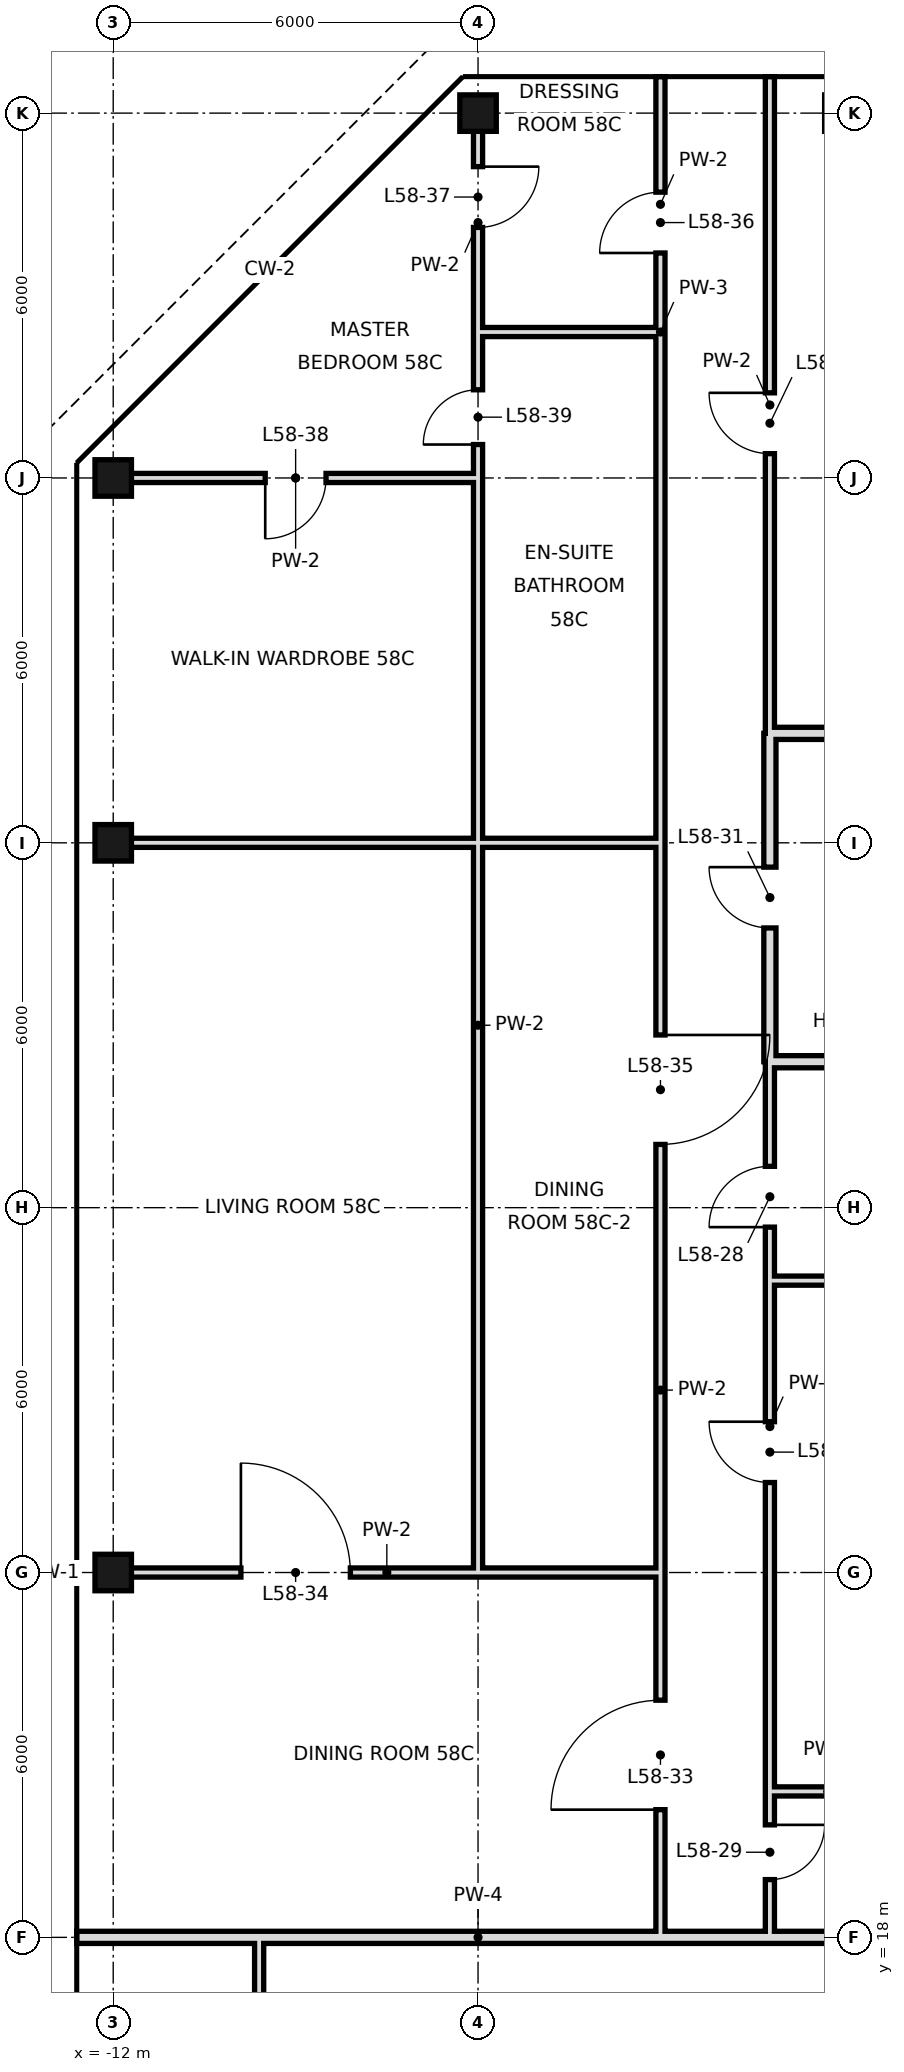
"""IFC4 building model, lengths in metres.
Left out: names, types, materials, properties, quantities, classifications, styles, units other than length and angle.
Written with IfcOpenShell. Run it as: python <this file> out.ifc"""

import sys

from ifc_helpers import new_model, si_unit, direction, frame, frame_2d, origin, origin_2d, place, context, subcontext, project, spatial, rectangle, hollow_rectangle, extrude, element, fill, save


model = new_model("IFC4")
c1 = context("Model", 3, precision=1e-05, world=origin(), true_north=direction((0.0, 1.0)))
c2 = subcontext(c1, "Body", "Model", "MODEL_VIEW")
j1 = project(units=[si_unit("LENGTHUNIT", "METRE"), si_unit("PLANEANGLEUNIT", "RADIAN")], contexts=[c1])
p1 = place(None, origin())
s1 = spatial("IfcSite", under=j1, at=p1, CompositionType="ELEMENT")
p2 = place(p1, origin())
s2 = spatial("IfcBuilding", under=s1, at=p2, CompositionType="ELEMENT")
p3 = place(p2, frame((0.0, 0.0, 246.8)))
s3 = spatial("IfcBuildingStorey", under=s2, at=p3, CompositionType="ELEMENT", Elevation=246.8)
for number, where, z_axis, x_axis in (
    (1, (-12.0, 24.0, 0.0), (0.0, 0.0, 1.0), (1.0, 0.0, 0.0)),
    (2, (-12.0, 36.0, 0.0), (0.0, 0.0, 1.0), (1.0, 0.0, 0.0)),
    (3, (-12.0, 42.0, 0.0), (0.0, 0.0, 1.0), (1.0, 0.0, 0.0)),
    (4, (-6.0, 48.0, 0.0), (0.0, 0.0, 1.0), (1.0, 0.0, 0.0)),
):
    element("IfcColumn", number, at=place(p3, frame(where, z_axis=z_axis, x_axis=x_axis)), inside=s3, PredefinedType="COLUMN", context=c2, shape_type="SweptSolid", body=[
        extrude(hollow_rectangle(XDim=0.6, YDim=0.6, WallThickness=0.028, at=origin_2d()), origin(), (0.0, 0.0, 1.0), 3.6),
    ])
p4 = place(p3, frame((-1.2, 32.4, 0.0), z_axis=(0.0, 0.0, 1.0), x_axis=(0.0, 1.0, 0.0)))
e5 = element("IfcWall", 5, at=p4, inside=s3, PredefinedType="SOLIDWALL", context=c2, shape_type="SweptSolid", body=[
    extrude(rectangle(XDim=5.4, YDim=0.2, at=frame_2d((2.7, 0.0))), origin(), (0.0, 0.0, 1.0), 2.72),
])
p5 = place(p4, frame((2.2, 0.0, 0.0)))
e6 = element("IfcOpeningElement", 6, at=p5, cuts=e5, PredefinedType="OPENING", context=c2, shape_type="SweptSolid", body=[
    extrude(rectangle(XDim=1.0, YDim=2.4, at=frame_2d((0.5, 1.2))), frame((0.0, 0.11, 0.0), z_axis=(0.0, -1.0, 0.0), x_axis=(1.0, 0.0, 0.0)), (0.0, 0.0, 1.0), 0.22),
])
p6 = place(p3, frame((-1.2, 20.4, 0.0), z_axis=(0.0, 0.0, 1.0), x_axis=(0.0, 1.0, 0.0)))
e7 = element("IfcWall", 7, at=p6, inside=s3, PredefinedType="PARTITIONING", context=c2, shape_type="SweptSolid", body=[
    extrude(rectangle(XDim=12.0, YDim=0.15, at=frame_2d((6.0, 0.0))), origin(), (0.0, 0.0, 1.0), 3.42),
])
p7 = place(p6, frame((9.28, 0.0, 0.0)))
e8 = element("IfcOpeningElement", 8, at=p7, cuts=e7, PredefinedType="OPENING", context=c2, shape_type="SweptSolid", body=[
    extrude(rectangle(XDim=1.0, YDim=2.4, at=frame_2d((0.5, 1.2))), frame((0.0, 0.085, 0.0), z_axis=(0.0, -1.0, 0.0), x_axis=(1.0, 0.0, 0.0)), (0.0, 0.0, 1.0), 0.17),
])
p8 = place(p6, frame((5.08, 0.0, 0.0)))
e9 = element("IfcOpeningElement", 9, at=p8, cuts=e7, PredefinedType="OPENING", context=c2, shape_type="SweptSolid", body=[
    extrude(rectangle(XDim=1.0, YDim=2.4, at=frame_2d((0.5, 1.2))), frame((0.0, 0.085, 0.0), z_axis=(0.0, -1.0, 0.0), x_axis=(1.0, 0.0, 0.0)), (0.0, 0.0, 1.0), 0.17),
])
p9 = place(p3, frame((-1.2, 37.8, 0.0), z_axis=(0.0, 0.0, 1.0), x_axis=(0.0, 1.0, 0.0)))
e10 = element("IfcWall", 10, at=p9, inside=s3, PredefinedType="PARTITIONING", context=c2, shape_type="SweptSolid", body=[
    extrude(rectangle(XDim=10.8, YDim=0.15, at=frame_2d((5.4, 0.0))), origin(), (0.0, 0.0, 1.0), 3.42),
])
p10 = place(p9, frame((4.6, 0.0, 0.0)))
e11 = element("IfcOpeningElement", 11, at=p10, cuts=e10, PredefinedType="OPENING", context=c2, shape_type="SweptSolid", body=[
    extrude(rectangle(XDim=1.0, YDim=2.4, at=frame_2d((0.5, 1.2))), frame((0.0, 0.085, 0.0), z_axis=(0.0, -1.0, 0.0), x_axis=(1.0, 0.0, 0.0)), (0.0, 0.0, 1.0), 0.17),
])
p11 = place(p3, frame((-1.2, 18.0, 0.0), z_axis=(0.0, 0.0, 1.0), x_axis=(0.0, 1.0, 0.0)))
e12 = element("IfcWall", 12, at=p11, inside=s3, PredefinedType="PARTITIONING", context=c2, shape_type="SweptSolid", body=[
    extrude(rectangle(XDim=2.4, YDim=0.15, at=frame_2d((1.2, 0.0))), origin(), (0.0, 0.0, 1.0), 3.42),
])
p12 = place(p11, frame((0.95, 0.0, 0.0)))
e13 = element("IfcOpeningElement", 13, at=p12, cuts=e12, PredefinedType="OPENING", context=c2, shape_type="SweptSolid", body=[
    extrude(rectangle(XDim=0.9, YDim=2.4, at=frame_2d((0.45, 1.2))), frame((0.0, 0.085, 0.0), z_axis=(0.0, -1.0, 0.0), x_axis=(1.0, 0.0, 0.0)), (0.0, 0.0, 1.0), 0.17),
])
p13 = place(p3, frame((-3.0, 18.0, 0.0), z_axis=(0.0, 0.0, 1.0), x_axis=(0.0, 1.0, 0.0)))
e14 = element("IfcWall", 14, at=p13, inside=s3, PredefinedType="PARTITIONING", context=c2, shape_type="SweptSolid", body=[
    extrude(rectangle(XDim=18.0, YDim=0.15, at=frame_2d((9.0, 0.0))), origin(), (0.0, 0.0, 1.0), 3.42),
])
p14 = place(p13, frame((2.1, 0.0, 0.0)))
e15 = element("IfcOpeningElement", 15, at=p14, cuts=e14, PredefinedType="OPENING", context=c2, shape_type="SweptSolid", body=[
    extrude(rectangle(XDim=1.8, YDim=2.4, at=frame_2d((0.9, 1.2))), frame((0.0, 0.085, 0.0), z_axis=(0.0, -1.0, 0.0), x_axis=(1.0, 0.0, 0.0)), (0.0, 0.0, 1.0), 0.17),
])
p15 = place(p13, frame((13.04, 0.0, 0.0)))
e16 = element("IfcOpeningElement", 16, at=p15, cuts=e14, PredefinedType="OPENING", context=c2, shape_type="SweptSolid", body=[
    extrude(rectangle(XDim=1.8, YDim=2.4, at=frame_2d((0.9, 1.2))), frame((0.0, 0.085, 0.0), z_axis=(0.0, -1.0, 0.0), x_axis=(1.0, 0.0, 0.0)), (0.0, 0.0, 1.0), 0.17),
])
p16 = place(p3, frame((-3.0, 44.4, 0.0), z_axis=(0.0, 0.0, 1.0), x_axis=(0.0, 1.0, 0.0)))
e17 = element("IfcWall", 17, at=p16, inside=s3, PredefinedType="PARTITIONING", context=c2, shape_type="SweptSolid", body=[
    extrude(rectangle(XDim=4.2, YDim=0.15, at=frame_2d((2.1, 0.0))), origin(), (0.0, 0.0, 1.0), 3.42),
])
p17 = place(p16, frame((1.3, 0.0, 0.0)))
e18 = element("IfcOpeningElement", 18, at=p17, cuts=e17, PredefinedType="OPENING", context=c2, shape_type="SweptSolid", body=[
    extrude(rectangle(XDim=1.0, YDim=2.4, at=frame_2d((0.5, 1.2))), frame((0.0, 0.085, 0.0), z_axis=(0.0, -1.0, 0.0), x_axis=(1.0, 0.0, 0.0)), (0.0, 0.0, 1.0), 0.17),
])
p18 = place(p3, frame((-3.0, 36.0, 0.0), z_axis=(0.0, 0.0, 1.0), x_axis=(0.0, 1.0, 0.0)))
e19 = element("IfcWall", 19, at=p18, inside=s3, PredefinedType="PARTITIONING", context=c2, shape_type="SweptSolid", body=[
    extrude(rectangle(XDim=8.4, YDim=0.15, at=frame_2d((4.2, 0.0))), origin(), (0.0, 0.0, 1.0), 3.42),
])
p19 = place(p3, frame((-6.0, 24.0, 0.0), z_axis=(0.0, 0.0, 1.0), x_axis=(0.0, 1.0, 0.0)))
e20 = element("IfcWall", 20, at=p19, inside=s3, PredefinedType="PARTITIONING", context=c2, shape_type="SweptSolid", body=[
    extrude(rectangle(XDim=12.0, YDim=0.15, at=frame_2d((6.0, 0.0))), origin(), (0.0, 0.0, 1.0), 3.42),
])
p20 = place(p3, frame((-6.0, 44.4, 0.0), z_axis=(0.0, 0.0, 1.0), x_axis=(0.0, 1.0, 0.0)))
e21 = element("IfcWall", 21, at=p20, inside=s3, PredefinedType="PARTITIONING", context=c2, shape_type="SweptSolid", body=[
    extrude(rectangle(XDim=3.6, YDim=0.15, at=frame_2d((1.8, 0.0))), origin(), (0.0, 0.0, 1.0), 3.42),
])
p21 = place(p20, frame((1.72, 0.0, 0.0)))
e22 = element("IfcOpeningElement", 22, at=p21, cuts=e21, PredefinedType="OPENING", context=c2, shape_type="SweptSolid", body=[
    extrude(rectangle(XDim=1.0, YDim=2.4, at=frame_2d((0.5, 1.2))), frame((0.0, 0.085, 0.0), z_axis=(0.0, -1.0, 0.0), x_axis=(1.0, 0.0, 0.0)), (0.0, 0.0, 1.0), 0.17),
])
p22 = place(p3, frame((-6.0, 36.0, 0.0), z_axis=(0.0, 0.0, 1.0), x_axis=(0.0, 1.0, 0.0)))
e23 = element("IfcWall", 23, at=p22, inside=s3, PredefinedType="PARTITIONING", context=c2, shape_type="SweptSolid", body=[
    extrude(rectangle(XDim=8.4, YDim=0.15, at=frame_2d((4.2, 0.0))), origin(), (0.0, 0.0, 1.0), 3.42),
])
p23 = place(p22, frame((6.55, 0.0, 0.0)))
e24 = element("IfcOpeningElement", 24, at=p23, cuts=e23, PredefinedType="OPENING", context=c2, shape_type="SweptSolid", body=[
    extrude(rectangle(XDim=0.9, YDim=2.4, at=frame_2d((0.45, 1.2))), frame((0.0, 0.085, 0.0), z_axis=(0.0, -1.0, 0.0), x_axis=(1.0, 0.0, 0.0)), (0.0, 0.0, 1.0), 0.17),
])
p24 = place(p3, frame((-9.6, 10.8, 0.0), z_axis=(0.0, 0.0, 1.0), x_axis=(0.0, 1.0, 0.0)))
e25 = element("IfcWall", 25, at=p24, inside=s3, PredefinedType="PARTITIONING", context=c2, shape_type="SweptSolid", body=[
    extrude(rectangle(XDim=7.2, YDim=0.15, at=frame_2d((3.6, 0.0))), origin(), (0.0, 0.0, 1.0), 3.42),
])
p25 = place(p3, frame((-12.6, 18.0, 0.0), z_axis=(0.0, 0.0, 1.0), x_axis=(1.0, 0.0, 0.0)))
e26 = element("IfcWall", 26, at=p25, inside=s3, PredefinedType="SOLIDWALL", context=c2, shape_type="SweptSolid", body=[
    extrude(rectangle(XDim=13.2, YDim=0.2, at=frame_2d((6.6, 0.0))), origin(), (0.0, 0.0, 1.0), 2.72),
])
p26 = place(p3, frame((-1.2, 20.4, 0.0), z_axis=(0.0, 0.0, 1.0), x_axis=(1.0, 0.0, 0.0)))
e27 = element("IfcWall", 27, at=p26, inside=s3, PredefinedType="PARTITIONING", context=c2, shape_type="SweptSolid", body=[
    extrude(rectangle(XDim=4.3, YDim=0.15, at=frame_2d((2.15, 0.0))), origin(), (0.0, 0.0, 1.0), 3.42),
])
p27 = place(p3, frame((-12.0, 24.0, 0.0), z_axis=(0.0, 0.0, 1.0), x_axis=(1.0, 0.0, 0.0)))
e28 = element("IfcWall", 28, at=p27, inside=s3, PredefinedType="PARTITIONING", context=c2, shape_type="SweptSolid", body=[
    extrude(rectangle(XDim=9.0, YDim=0.15, at=frame_2d((4.5, 0.0))), origin(), (0.0, 0.0, 1.0), 2.72),
])
p28 = place(p27, frame((2.1, 0.0, 0.0)))
e29 = element("IfcOpeningElement", 29, at=p28, cuts=e28, PredefinedType="OPENING", context=c2, shape_type="SweptSolid", body=[
    extrude(rectangle(XDim=1.8, YDim=2.4, at=frame_2d((0.9, 1.2))), frame((0.0, 0.085, 0.0), z_axis=(0.0, -1.0, 0.0), x_axis=(1.0, 0.0, 0.0)), (0.0, 0.0, 1.0), 0.17),
])
p29 = place(p3, frame((-1.2, 28.8, 0.0), z_axis=(0.0, 0.0, 1.0), x_axis=(1.0, 0.0, 0.0)))
e30 = element("IfcWall", 30, at=p29, inside=s3, PredefinedType="PARTITIONING", context=c2, shape_type="SweptSolid", body=[
    extrude(rectangle(XDim=4.3, YDim=0.15, at=frame_2d((2.15, 0.0))), origin(), (0.0, 0.0, 1.0), 3.42),
])
p30 = place(p3, frame((-1.2, 32.4, 0.0), z_axis=(0.0, 0.0, 1.0), x_axis=(1.0, 0.0, 0.0)))
e31 = element("IfcWall", 31, at=p30, inside=s3, PredefinedType="SOLIDWALL", context=c2, shape_type="SweptSolid", body=[
    extrude(rectangle(XDim=4.3, YDim=0.2, at=frame_2d((2.15, 0.0))), origin(), (0.0, 0.0, 1.0), 2.72),
])
p31 = place(p3, frame((-12.0, 36.0, 0.0), z_axis=(0.0, 0.0, 1.0), x_axis=(1.0, 0.0, 0.0)))
e32 = element("IfcWall", 32, at=p31, inside=s3, PredefinedType="PARTITIONING", context=c2, shape_type="SweptSolid", body=[
    extrude(rectangle(XDim=6.0, YDim=0.15, at=frame_2d((3.0, 0.0))), origin(), (0.0, 0.0, 1.0), 2.72),
])
p32 = place(p3, frame((-6.0, 36.0, 0.0), z_axis=(0.0, 0.0, 1.0), x_axis=(1.0, 0.0, 0.0)))
e33 = element("IfcWall", 33, at=p32, inside=s3, PredefinedType="PARTITIONING", context=c2, shape_type="SweptSolid", body=[
    extrude(rectangle(XDim=3.0, YDim=0.15, at=frame_2d((1.5, 0.0))), origin(), (0.0, 0.0, 1.0), 2.72),
])
p33 = place(p3, frame((-1.2, 37.8, 0.0), z_axis=(0.0, 0.0, 1.0), x_axis=(1.0, 0.0, 0.0)))
e34 = element("IfcWall", 34, at=p33, inside=s3, PredefinedType="SOLIDWALL", context=c2, shape_type="SweptSolid", body=[
    extrude(rectangle(XDim=4.3, YDim=0.2, at=frame_2d((2.15, 0.0))), origin(), (0.0, 0.0, 1.0), 2.72),
])
p34 = place(p3, frame((-12.0, 42.0, 0.0), z_axis=(0.0, 0.0, 1.0), x_axis=(1.0, 0.0, 0.0)))
e35 = element("IfcWall", 35, at=p34, inside=s3, PredefinedType="PARTITIONING", context=c2, shape_type="SweptSolid", body=[
    extrude(rectangle(XDim=6.0, YDim=0.15, at=frame_2d((3.0, 0.0))), origin(), (0.0, 0.0, 1.0), 2.72),
])
p35 = place(p34, frame((2.5, 0.0, 0.0)))
e36 = element("IfcOpeningElement", 36, at=p35, cuts=e35, PredefinedType="OPENING", context=c2, shape_type="SweptSolid", body=[
    extrude(rectangle(XDim=1.0, YDim=2.4, at=frame_2d((0.5, 1.2))), frame((0.0, 0.085, 0.0), z_axis=(0.0, -1.0, 0.0), x_axis=(1.0, 0.0, 0.0)), (0.0, 0.0, 1.0), 0.17),
])
p36 = place(p3, frame((-6.0, 44.4, 0.0), z_axis=(0.0, 0.0, 1.0), x_axis=(1.0, 0.0, 0.0)))
e37 = element("IfcWall", 37, at=p36, inside=s3, PredefinedType="PARTITIONING", context=c2, shape_type="SweptSolid", body=[
    extrude(rectangle(XDim=3.0, YDim=0.15, at=frame_2d((1.5, 0.0))), origin(), (0.0, 0.0, 1.0), 3.42),
])
p37 = place(p7, origin())
e38 = element("IfcDoor", 38, at=p37, inside=s3, OperationType="SINGLE_SWING_LEFT", PredefinedType="DOOR", context=c2, shape_type="SweptSolid", body=[
    extrude(rectangle(XDim=1.0, YDim=2.4, at=frame_2d((0.5, 1.2))), frame((0.0, 0.025, 0.0), z_axis=(0.0, -1.0, 0.0), x_axis=(1.0, 0.0, 0.0)), (0.0, 0.0, 1.0), 0.05),
])
fill(e8, e38)
p38 = place(p12, origin())
e39 = element("IfcDoor", 39, at=p38, inside=s3, OperationType="SINGLE_SWING_RIGHT", PredefinedType="DOOR", context=c2, shape_type="SweptSolid", body=[
    extrude(rectangle(XDim=0.9, YDim=2.4, at=frame_2d((0.45, 1.2))), frame((0.0, 0.025, 0.0), z_axis=(0.0, -1.0, 0.0), x_axis=(1.0, 0.0, 0.0)), (0.0, 0.0, 1.0), 0.05),
])
fill(e13, e39)
p39 = place(p8, frame((1.0, 0.0, 0.0), z_axis=(0.0, 0.0, 1.0), x_axis=(-1.0, 0.0, 0.0)))
e40 = element("IfcDoor", 40, at=p39, inside=s3, OperationType="SINGLE_SWING_LEFT", PredefinedType="DOOR", context=c2, shape_type="SweptSolid", body=[
    extrude(rectangle(XDim=1.0, YDim=2.4, at=frame_2d((0.5, 1.2))), frame((0.0, 0.025, 0.0), z_axis=(0.0, -1.0, 0.0), x_axis=(1.0, 0.0, 0.0)), (0.0, 0.0, 1.0), 0.05),
])
fill(e9, e40)
p40 = place(p5, frame((1.0, 0.0, 0.0), z_axis=(0.0, 0.0, 1.0), x_axis=(-1.0, 0.0, 0.0)))
e41 = element("IfcDoor", 41, at=p40, inside=s3, OperationType="SINGLE_SWING_LEFT", PredefinedType="DOOR", context=c2, shape_type="SweptSolid", body=[
    extrude(rectangle(XDim=1.0, YDim=2.4, at=frame_2d((0.5, 1.2))), frame((0.0, 0.025, 0.0), z_axis=(0.0, -1.0, 0.0), x_axis=(1.0, 0.0, 0.0)), (0.0, 0.0, 1.0), 0.05),
])
fill(e6, e41)
p41 = place(p10, frame((1.0, 0.0, 0.0), z_axis=(0.0, 0.0, 1.0), x_axis=(-1.0, 0.0, 0.0)))
e42 = element("IfcDoor", 42, at=p41, inside=s3, OperationType="SINGLE_SWING_LEFT", PredefinedType="DOOR", context=c2, shape_type="SweptSolid", body=[
    extrude(rectangle(XDim=1.0, YDim=2.4, at=frame_2d((0.5, 1.2))), frame((0.0, 0.025, 0.0), z_axis=(0.0, -1.0, 0.0), x_axis=(1.0, 0.0, 0.0)), (0.0, 0.0, 1.0), 0.05),
])
fill(e11, e42)
p42 = place(p14, origin())
e43 = element("IfcDoor", 43, at=p42, inside=s3, OperationType="SINGLE_SWING_LEFT", PredefinedType="DOOR", context=c2, shape_type="SweptSolid", body=[
    extrude(rectangle(XDim=1.8, YDim=2.4, at=frame_2d((0.9, 1.2))), frame((0.0, 0.025, 0.0), z_axis=(0.0, -1.0, 0.0), x_axis=(1.0, 0.0, 0.0)), (0.0, 0.0, 1.0), 0.05),
])
fill(e15, e43)
p43 = place(p28, origin())
e44 = element("IfcDoor", 44, at=p43, inside=s3, OperationType="SINGLE_SWING_LEFT", PredefinedType="DOOR", context=c2, shape_type="SweptSolid", body=[
    extrude(rectangle(XDim=1.8, YDim=2.4, at=frame_2d((0.9, 1.2))), frame((0.0, 0.025, 0.0), z_axis=(0.0, -1.0, 0.0), x_axis=(1.0, 0.0, 0.0)), (0.0, 0.0, 1.0), 0.05),
])
fill(e29, e44)
p44 = place(p15, origin())
e45 = element("IfcDoor", 45, at=p44, inside=s3, OperationType="SINGLE_SWING_RIGHT", PredefinedType="DOOR", context=c2, shape_type="SweptSolid", body=[
    extrude(rectangle(XDim=1.8, YDim=2.4, at=frame_2d((0.9, 1.2))), frame((0.0, 0.025, 0.0), z_axis=(0.0, -1.0, 0.0), x_axis=(1.0, 0.0, 0.0)), (0.0, 0.0, 1.0), 0.05),
])
fill(e16, e45)
p45 = place(p17, origin())
e46 = element("IfcDoor", 46, at=p45, inside=s3, OperationType="SINGLE_SWING_LEFT", PredefinedType="DOOR", context=c2, shape_type="SweptSolid", body=[
    extrude(rectangle(XDim=1.0, YDim=2.4, at=frame_2d((0.5, 1.2))), frame((0.0, 0.025, 0.0), z_axis=(0.0, -1.0, 0.0), x_axis=(1.0, 0.0, 0.0)), (0.0, 0.0, 1.0), 0.05),
])
fill(e18, e46)
p46 = place(p21, origin())
e47 = element("IfcDoor", 47, at=p46, inside=s3, OperationType="SINGLE_SWING_RIGHT", PredefinedType="DOOR", context=c2, shape_type="SweptSolid", body=[
    extrude(rectangle(XDim=1.0, YDim=2.4, at=frame_2d((0.5, 1.2))), frame((0.0, 0.025, 0.0), z_axis=(0.0, -1.0, 0.0), x_axis=(1.0, 0.0, 0.0)), (0.0, 0.0, 1.0), 0.05),
])
fill(e22, e47)
p47 = place(p35, frame((1.0, 0.0, 0.0), z_axis=(0.0, 0.0, 1.0), x_axis=(-1.0, 0.0, 0.0)))
e48 = element("IfcDoor", 48, at=p47, inside=s3, OperationType="SINGLE_SWING_RIGHT", PredefinedType="DOOR", context=c2, shape_type="SweptSolid", body=[
    extrude(rectangle(XDim=1.0, YDim=2.4, at=frame_2d((0.5, 1.2))), frame((0.0, 0.025, 0.0), z_axis=(0.0, -1.0, 0.0), x_axis=(1.0, 0.0, 0.0)), (0.0, 0.0, 1.0), 0.05),
])
fill(e36, e48)
p48 = place(p23, origin())
e49 = element("IfcDoor", 49, at=p48, inside=s3, OperationType="SINGLE_SWING_LEFT", PredefinedType="DOOR", context=c2, shape_type="SweptSolid", body=[
    extrude(rectangle(XDim=0.9, YDim=2.4, at=frame_2d((0.45, 1.2))), frame((0.0, 0.025, 0.0), z_axis=(0.0, -1.0, 0.0), x_axis=(1.0, 0.0, 0.0)), (0.0, 0.0, 1.0), 0.05),
])
fill(e24, e49)
save(model, sys.argv[1])
